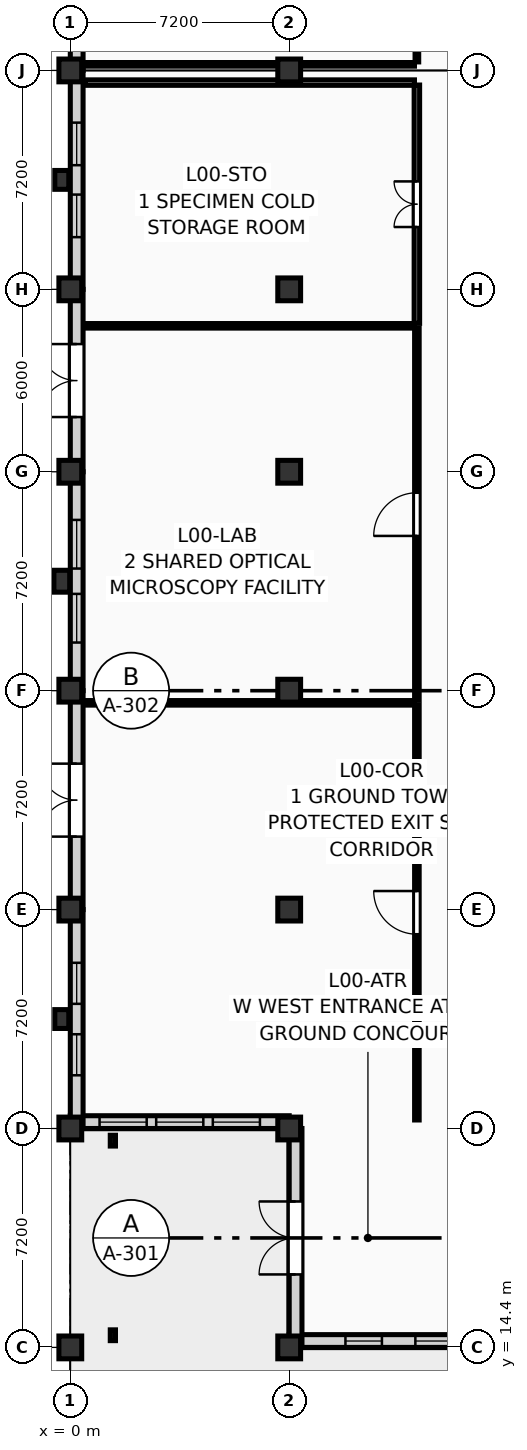
"""IFC4 building model, lengths in metres.
Left out: names, types, materials, properties, quantities, classifications, styles, units other than length and angle.
Written with IfcOpenShell. Run it as: python <this file> out.ifc"""

import sys

from ifc_helpers import new_model, si_unit, direction, frame, frame_2d, origin, origin_2d, place, context, subcontext, project, spatial, rectangle, i_section, extrude, element, fill, save


model = new_model("IFC4")
c1 = context("Model", 3, precision=1e-05, world=origin(), true_north=direction((0.0, 1.0)))
c2 = subcontext(c1, "Body", "Model", "MODEL_VIEW")
j1 = project(units=[si_unit("LENGTHUNIT", "METRE"), si_unit("PLANEANGLEUNIT", "RADIAN")], contexts=[c1])
p1 = place(None, origin())
s1 = spatial("IfcSite", under=j1, at=p1, CompositionType="ELEMENT")
p2 = place(p1, origin())
s2 = spatial("IfcBuilding", under=s1, at=p2, CompositionType="ELEMENT")
p3 = place(p2, origin())
s3 = spatial("IfcBuildingStorey", under=s2, at=p3, CompositionType="ELEMENT", Elevation=0.0)
for number, where, z_axis, x_axis in (
    (1, (0.0, 14.4, 0.0), (0.0, 0.0, 1.0), (1.0, 0.0, 0.0)),
    (2, (0.0, 21.6, 0.0), (0.0, 0.0, 1.0), (1.0, 0.0, 0.0)),
    (3, (0.0, 28.8, 0.0), (0.0, 0.0, 1.0), (1.0, 0.0, 0.0)),
    (4, (0.0, 36.0, 0.0), (0.0, 0.0, 1.0), (1.0, 0.0, 0.0)),
    (5, (0.0, 43.2, 0.0), (0.0, 0.0, 1.0), (1.0, 0.0, 0.0)),
    (6, (0.0, 49.2, 0.0), (0.0, 0.0, 1.0), (1.0, 0.0, 0.0)),
    (7, (0.0, 56.4, 0.0), (0.0, 0.0, 1.0), (1.0, 0.0, 0.0)),
    (8, (7.2, 14.4, 0.0), (0.0, 0.0, 1.0), (1.0, 0.0, 0.0)),
    (9, (7.2, 21.6, 0.0), (0.0, 0.0, 1.0), (1.0, 0.0, 0.0)),
    (10, (7.2, 28.8, 0.0), (0.0, 0.0, 1.0), (1.0, 0.0, 0.0)),
    (11, (7.2, 36.0, 0.0), (0.0, 0.0, 1.0), (1.0, 0.0, 0.0)),
    (12, (7.2, 43.2, 0.0), (0.0, 0.0, 1.0), (1.0, 0.0, 0.0)),
    (13, (7.2, 49.2, 0.0), (0.0, 0.0, 1.0), (1.0, 0.0, 0.0)),
    (14, (7.2, 56.4, 0.0), (0.0, 0.0, 1.0), (1.0, 0.0, 0.0)),
):
    element("IfcColumn", number, at=place(p3, frame(where, z_axis=z_axis, x_axis=x_axis)), inside=s3, PredefinedType="COLUMN", context=c2, shape_type="SweptSolid", body=[
        extrude(rectangle(XDim=0.75, YDim=0.75, at=origin_2d()), origin(), (0.0, 0.0, 1.0), 4.5),
    ])
for number, where, z_axis, x_axis in (
    (15, (1.4, 14.8, 0.0), (0.0, 0.0, 1.0), (1.0, 0.0, 0.0)),
    (16, (1.4, 21.2, 0.0), (0.0, 0.0, 1.0), (1.0, 0.0, 0.0)),
):
    element("IfcColumn", number, at=place(p3, frame(where, z_axis=z_axis, x_axis=x_axis)), inside=s3, PredefinedType="COLUMN", context=c2, shape_type="SweptSolid", body=[
        extrude(i_section(OverallWidth=0.171, OverallDepth=0.355, WebThickness=0.007, FlangeThickness=0.012, FilletRadius=0.013, at=origin_2d()), origin(), (0.0, 0.0, 1.0), 4.2),
    ])
p4 = place(p3, frame((-0.28, 25.2, 0.0), z_axis=(0.0, 0.0, 1.0), x_axis=(1.0, 0.0, 0.0)))
e17 = element("IfcColumn", 17, at=p4, inside=s3, PredefinedType="PILASTER", context=c2, shape_type="SweptSolid", body=[
    extrude(rectangle(XDim=0.46, YDim=0.62, at=origin_2d()), origin(), (0.0, 0.0, 1.0), 4.5),
])
p5 = place(p3, frame((-0.28, 39.6, 0.0), z_axis=(0.0, 0.0, 1.0), x_axis=(1.0, 0.0, 0.0)))
e18 = element("IfcColumn", 18, at=p5, inside=s3, PredefinedType="PILASTER", context=c2, shape_type="SweptSolid", body=[
    extrude(rectangle(XDim=0.52, YDim=0.72, at=origin_2d()), origin(), (0.0, 0.0, 1.0), 4.5),
])
p6 = place(p3, frame((-0.28, 52.8, 0.0), z_axis=(0.0, 0.0, 1.0), x_axis=(1.0, 0.0, 0.0)))
e19 = element("IfcColumn", 19, at=p6, inside=s3, PredefinedType="PILASTER", context=c2, shape_type="SweptSolid", body=[
    extrude(rectangle(XDim=0.46, YDim=0.62, at=origin_2d()), origin(), (0.0, 0.0, 1.0), 4.5),
])
p7 = place(p3, frame((7.2, 14.61, 0.0), z_axis=(0.0, 0.0, 1.0), x_axis=(1.0, 0.0, 0.0)))
e20 = element("IfcWall", 20, at=p7, inside=s3, PredefinedType="SOLIDWALL", context=c2, shape_type="SweptSolid", body=[
    extrude(rectangle(XDim=7.2, YDim=0.42, at=frame_2d((3.6, 0.0))), origin(), (0.0, 0.0, 1.0), 3.62),
])
p8 = place(p7, frame((1.85, 0.0, 0.45)))
e21 = element("IfcOpeningElement", 21, at=p8, cuts=e20, PredefinedType="OPENING", context=c2, shape_type="SweptSolid", body=[
    extrude(rectangle(XDim=1.2, YDim=2.35, at=frame_2d((0.6, 1.175))), frame((0.0, 0.222, 0.0), z_axis=(0.0, -1.0, 0.0), x_axis=(1.0, 0.0, 0.0)), (0.0, 0.0, 1.0), 0.444),
])
p9 = place(p7, frame((4.15, 0.0, 0.45)))
e22 = element("IfcOpeningElement", 22, at=p9, cuts=e20, PredefinedType="OPENING", context=c2, shape_type="SweptSolid", body=[
    extrude(rectangle(XDim=1.2, YDim=2.35, at=frame_2d((0.6, 1.175))), frame((0.0, 0.222, 0.0), z_axis=(0.0, -1.0, 0.0), x_axis=(1.0, 0.0, 0.0)), (0.0, 0.0, 1.0), 0.444),
])
p10 = place(p3, frame((7.41, 14.4, 0.0), z_axis=(0.0, 0.0, 1.0), x_axis=(0.0, 1.0, 0.0)))
e23 = element("IfcWall", 23, at=p10, inside=s3, PredefinedType="SOLIDWALL", context=c2, shape_type="SweptSolid", body=[
    extrude(rectangle(XDim=7.2, YDim=0.42, at=frame_2d((3.6, 0.0))), origin(), (0.0, 0.0, 1.0), 3.62),
])
p11 = place(p10, frame((2.4, 0.0, 0.0)))
e24 = element("IfcOpeningElement", 24, at=p11, cuts=e23, PredefinedType="OPENING", context=c2, shape_type="SweptSolid", body=[
    extrude(rectangle(XDim=2.4, YDim=2.6, at=frame_2d((1.2, 1.3))), frame((0.0, 0.222, 0.0), z_axis=(0.0, -1.0, 0.0), x_axis=(1.0, 0.0, 0.0)), (0.0, 0.0, 1.0), 0.444),
])
p12 = place(p3, frame((0.0, 21.81, 0.0), z_axis=(0.0, 0.0, 1.0), x_axis=(1.0, 0.0, 0.0)))
e25 = element("IfcWall", 25, at=p12, inside=s3, PredefinedType="SOLIDWALL", context=c2, shape_type="SweptSolid", body=[
    extrude(rectangle(XDim=7.2, YDim=0.42, at=frame_2d((3.6, 0.0))), origin(), (0.0, 0.0, 1.0), 3.62),
])
p13 = place(p12, frame((0.962, 0.0, 0.18)))
e26 = element("IfcOpeningElement", 26, at=p13, cuts=e25, PredefinedType="OPENING", context=c2, shape_type="SweptSolid", body=[
    extrude(rectangle(XDim=1.55, YDim=3.25, at=frame_2d((0.775, 1.625))), frame((0.0, 0.222, 0.0), z_axis=(0.0, -1.0, 0.0), x_axis=(1.0, 0.0, 0.0)), (0.0, 0.0, 1.0), 0.444),
])
p14 = place(p12, frame((2.825, 0.0, 0.18)))
e27 = element("IfcOpeningElement", 27, at=p14, cuts=e25, PredefinedType="OPENING", context=c2, shape_type="SweptSolid", body=[
    extrude(rectangle(XDim=1.55, YDim=3.25, at=frame_2d((0.775, 1.625))), frame((0.0, 0.222, 0.0), z_axis=(0.0, -1.0, 0.0), x_axis=(1.0, 0.0, 0.0)), (0.0, 0.0, 1.0), 0.444),
])
p15 = place(p12, frame((4.688, 0.0, 0.18)))
e28 = element("IfcOpeningElement", 28, at=p15, cuts=e25, PredefinedType="OPENING", context=c2, shape_type="SweptSolid", body=[
    extrude(rectangle(XDim=1.55, YDim=3.25, at=frame_2d((0.775, 1.625))), frame((0.0, 0.222, 0.0), z_axis=(0.0, -1.0, 0.0), x_axis=(1.0, 0.0, 0.0)), (0.0, 0.0, 1.0), 0.444),
])
p16 = place(p3, frame((0.21, 21.6, 0.0), z_axis=(0.0, 0.0, 1.0), x_axis=(0.0, 1.0, 0.0)))
e29 = element("IfcWall", 29, at=p16, inside=s3, PredefinedType="SOLIDWALL", context=c2, shape_type="SweptSolid", body=[
    extrude(rectangle(XDim=7.2, YDim=0.42, at=frame_2d((3.6, 0.0))), origin(), (0.0, 0.0, 1.0), 3.62),
])
p17 = place(p16, frame((1.75, 0.0, 0.45)))
e30 = element("IfcOpeningElement", 30, at=p17, cuts=e29, PredefinedType="OPENING", context=c2, shape_type="SweptSolid", body=[
    extrude(rectangle(XDim=1.35, YDim=2.75, at=frame_2d((0.675, 1.375))), frame((0.0, 0.222, 0.0), z_axis=(0.0, -1.0, 0.0), x_axis=(1.0, 0.0, 0.0)), (0.0, 0.0, 1.0), 0.444),
])
p18 = place(p16, frame((4.1, 0.0, 0.45)))
e31 = element("IfcOpeningElement", 31, at=p18, cuts=e29, PredefinedType="OPENING", context=c2, shape_type="SweptSolid", body=[
    extrude(rectangle(XDim=1.35, YDim=2.75, at=frame_2d((0.675, 1.375))), frame((0.0, 0.222, 0.0), z_axis=(0.0, -1.0, 0.0), x_axis=(1.0, 0.0, 0.0)), (0.0, 0.0, 1.0), 0.444),
])
p19 = place(p3, frame((0.21, 28.8, 0.0), z_axis=(0.0, 0.0, 1.0), x_axis=(0.0, 1.0, 0.0)))
e32 = element("IfcWall", 32, at=p19, inside=s3, PredefinedType="SOLIDWALL", context=c2, shape_type="SweptSolid", body=[
    extrude(rectangle(XDim=7.2, YDim=0.42, at=frame_2d((3.6, 0.0))), origin(), (0.0, 0.0, 1.0), 3.62),
])
p20 = place(p19, frame((2.4, 0.0, 0.0)))
e33 = element("IfcOpeningElement", 33, at=p20, cuts=e32, PredefinedType="OPENING", context=c2, shape_type="SweptSolid", body=[
    extrude(rectangle(XDim=2.4, YDim=2.6, at=frame_2d((1.2, 1.3))), frame((0.0, 0.222, 0.0), z_axis=(0.0, -1.0, 0.0), x_axis=(1.0, 0.0, 0.0)), (0.0, 0.0, 1.0), 0.444),
])
p21 = place(p3, frame((0.21, 36.0, 0.0), z_axis=(0.0, 0.0, 1.0), x_axis=(0.0, 1.0, 0.0)))
e34 = element("IfcWall", 34, at=p21, inside=s3, PredefinedType="SOLIDWALL", context=c2, shape_type="SweptSolid", body=[
    extrude(rectangle(XDim=7.2, YDim=0.42, at=frame_2d((3.6, 0.0))), origin(), (0.0, 0.0, 1.0), 3.62),
])
p22 = place(p21, frame((1.583, 0.0, 0.45)))
e35 = element("IfcOpeningElement", 35, at=p22, cuts=e34, PredefinedType="OPENING", context=c2, shape_type="SweptSolid", body=[
    extrude(rectangle(XDim=1.6, YDim=2.65, at=frame_2d((0.8, 1.325))), frame((0.0, 0.222, 0.0), z_axis=(0.0, -1.0, 0.0), x_axis=(1.0, 0.0, 0.0)), (0.0, 0.0, 1.0), 0.444),
])
p23 = place(p21, frame((4.017, 0.0, 0.45)))
e36 = element("IfcOpeningElement", 36, at=p23, cuts=e34, PredefinedType="OPENING", context=c2, shape_type="SweptSolid", body=[
    extrude(rectangle(XDim=1.6, YDim=2.65, at=frame_2d((0.8, 1.325))), frame((0.0, 0.222, 0.0), z_axis=(0.0, -1.0, 0.0), x_axis=(1.0, 0.0, 0.0)), (0.0, 0.0, 1.0), 0.444),
])
p24 = place(p3, frame((0.21, 43.2, 0.0), z_axis=(0.0, 0.0, 1.0), x_axis=(0.0, 1.0, 0.0)))
e37 = element("IfcWall", 37, at=p24, inside=s3, PredefinedType="SOLIDWALL", context=c2, shape_type="SweptSolid", body=[
    extrude(rectangle(XDim=6.0, YDim=0.42, at=frame_2d((3.0, 0.0))), origin(), (0.0, 0.0, 1.0), 3.62),
])
p25 = place(p24, frame((1.8, 0.0, 0.0)))
e38 = element("IfcOpeningElement", 38, at=p25, cuts=e37, PredefinedType="OPENING", context=c2, shape_type="SweptSolid", body=[
    extrude(rectangle(XDim=2.4, YDim=2.6, at=frame_2d((1.2, 1.3))), frame((0.0, 0.222, 0.0), z_axis=(0.0, -1.0, 0.0), x_axis=(1.0, 0.0, 0.0)), (0.0, 0.0, 1.0), 0.444),
])
p26 = place(p3, frame((0.21, 49.2, 0.0), z_axis=(0.0, 0.0, 1.0), x_axis=(0.0, 1.0, 0.0)))
e39 = element("IfcWall", 39, at=p26, inside=s3, PredefinedType="SOLIDWALL", context=c2, shape_type="SweptSolid", body=[
    extrude(rectangle(XDim=7.2, YDim=0.42, at=frame_2d((3.6, 0.0))), origin(), (0.0, 0.0, 1.0), 3.62),
])
p27 = place(p26, frame((1.717, 0.0, 0.45)))
e40 = element("IfcOpeningElement", 40, at=p27, cuts=e39, PredefinedType="OPENING", context=c2, shape_type="SweptSolid", body=[
    extrude(rectangle(XDim=1.4, YDim=2.55, at=frame_2d((0.7, 1.275))), frame((0.0, 0.222, 0.0), z_axis=(0.0, -1.0, 0.0), x_axis=(1.0, 0.0, 0.0)), (0.0, 0.0, 1.0), 0.444),
])
p28 = place(p26, frame((4.083, 0.0, 0.45)))
e41 = element("IfcOpeningElement", 41, at=p28, cuts=e39, PredefinedType="OPENING", context=c2, shape_type="SweptSolid", body=[
    extrude(rectangle(XDim=1.4, YDim=2.55, at=frame_2d((0.7, 1.275))), frame((0.0, 0.222, 0.0), z_axis=(0.0, -1.0, 0.0), x_axis=(1.0, 0.0, 0.0)), (0.0, 0.0, 1.0), 0.444),
])
p29 = place(p3, frame((0.21, 56.4, 0.0), z_axis=(0.0, 0.0, 1.0), x_axis=(0.0, 1.0, 0.0)))
e42 = element("IfcWall", 42, at=p29, inside=s3, PredefinedType="SOLIDWALL", context=c2, shape_type="SweptSolid", body=[
    extrude(rectangle(XDim=7.2, YDim=0.42, at=frame_2d((3.6, 0.0))), origin(), (0.0, 0.0, 1.0), 3.62),
])
p30 = place(p29, frame((1.783, 0.0, 0.45)))
e43 = element("IfcOpeningElement", 43, at=p30, cuts=e42, PredefinedType="OPENING", context=c2, shape_type="SweptSolid", body=[
    extrude(rectangle(XDim=1.3, YDim=2.5, at=frame_2d((0.65, 1.25))), frame((0.0, 0.222, 0.0), z_axis=(0.0, -1.0, 0.0), x_axis=(1.0, 0.0, 0.0)), (0.0, 0.0, 1.0), 0.444),
])
p31 = place(p29, frame((4.117, 0.0, 0.45)))
e44 = element("IfcOpeningElement", 44, at=p31, cuts=e42, PredefinedType="OPENING", context=c2, shape_type="SweptSolid", body=[
    extrude(rectangle(XDim=1.3, YDim=2.5, at=frame_2d((0.65, 1.25))), frame((0.0, 0.222, 0.0), z_axis=(0.0, -1.0, 0.0), x_axis=(1.0, 0.0, 0.0)), (0.0, 0.0, 1.0), 0.444),
])
p32 = place(p3, frame((11.4, 21.88, 0.0), z_axis=(0.0, 0.0, 1.0), x_axis=(0.0, 1.0, 0.0)))
e45 = element("IfcWall", 45, at=p32, inside=s3, PredefinedType="PARTITIONING", context=c2, shape_type="SweptSolid", body=[
    extrude(rectangle(XDim=13.64, YDim=0.15, at=frame_2d((6.82, 0.0))), origin(), (0.0, 0.0, 1.0), 4.235),
])
p33 = place(p32, frame((6.11, 0.0, 0.0)))
e46 = element("IfcOpeningElement", 46, at=p33, cuts=e45, PredefinedType="OPENING", context=c2, shape_type="SweptSolid", body=[
    extrude(rectangle(XDim=1.42, YDim=2.22, at=frame_2d((0.71, 1.11))), frame((0.0, 0.087, 0.0), z_axis=(0.0, -1.0, 0.0), x_axis=(1.0, 0.0, 0.0)), (0.0, 0.0, 1.0), 0.174),
])
p34 = place(p3, frame((0.48, 35.6, 0.0), z_axis=(0.0, 0.0, 1.0), x_axis=(1.0, 0.0, 0.0)))
e47 = element("IfcWall", 47, at=p34, inside=s3, PredefinedType="PARTITIONING", context=c2, shape_type="SweptSolid", body=[
    extrude(rectangle(XDim=10.84, YDim=0.15, at=frame_2d((5.42, 0.0))), origin(), (0.0, 0.0, 1.0), 3.485),
])
p35 = place(p3, frame((11.4, 35.68, 0.0), z_axis=(0.0, 0.0, 1.0), x_axis=(0.0, 1.0, 0.0)))
e48 = element("IfcWall", 48, at=p35, inside=s3, PredefinedType="PARTITIONING", context=c2, shape_type="SweptSolid", body=[
    extrude(rectangle(XDim=12.24, YDim=0.15, at=frame_2d((6.12, 0.0))), origin(), (0.0, 0.0, 1.0), 4.235),
])
p36 = place(p35, frame((5.41, 0.0, 0.0)))
e49 = element("IfcOpeningElement", 49, at=p36, cuts=e48, PredefinedType="OPENING", context=c2, shape_type="SweptSolid", body=[
    extrude(rectangle(XDim=1.42, YDim=2.22, at=frame_2d((0.71, 1.11))), frame((0.0, 0.087, 0.0), z_axis=(0.0, -1.0, 0.0), x_axis=(1.0, 0.0, 0.0)), (0.0, 0.0, 1.0), 0.174),
])
p37 = place(p3, frame((0.48, 48.0, 0.0), z_axis=(0.0, 0.0, 1.0), x_axis=(1.0, 0.0, 0.0)))
e50 = element("IfcWall", 50, at=p37, inside=s3, PredefinedType="PARTITIONING", context=c2, shape_type="SweptSolid", body=[
    extrude(rectangle(XDim=10.84, YDim=0.15, at=frame_2d((5.42, 0.0))), origin(), (0.0, 0.0, 1.0), 4.235),
])
p38 = place(p3, frame((11.4, 48.08, 0.0), z_axis=(0.0, 0.0, 1.0), x_axis=(0.0, 1.0, 0.0)))
e51 = element("IfcWall", 51, at=p38, inside=s3, PredefinedType="PARTITIONING", context=c2, shape_type="SweptSolid", body=[
    extrude(rectangle(XDim=7.84, YDim=0.18, at=frame_2d((3.92, 0.0))), origin(), (0.0, 0.0, 1.0), 4.235),
])
p39 = place(p38, frame((3.17, 0.0, 0.0)))
e52 = element("IfcOpeningElement", 52, at=p39, cuts=e51, PredefinedType="OPENING", context=c2, shape_type="SweptSolid", body=[
    extrude(rectangle(XDim=1.5, YDim=2.25, at=frame_2d((0.75, 1.125))), frame((0.0, 0.102, 0.0), z_axis=(0.0, -1.0, 0.0), x_axis=(1.0, 0.0, 0.0)), (0.0, 0.0, 1.0), 0.204),
])
p40 = place(p3, frame((0.48, 56.0, 0.0), z_axis=(0.0, 0.0, 1.0), x_axis=(1.0, 0.0, 0.0)))
e53 = element("IfcWall", 53, at=p40, inside=s3, PredefinedType="PARTITIONING", context=c2, shape_type="SweptSolid", body=[
    extrude(rectangle(XDim=10.84, YDim=0.18, at=frame_2d((5.42, 0.0))), origin(), (0.0, 0.0, 1.0), 3.485),
])
p41 = place(p3, frame((0.48, 56.6, 0.0), z_axis=(0.0, 0.0, 1.0), x_axis=(1.0, 0.0, 0.0)))
e54 = element("IfcWall", 54, at=p41, inside=s3, PredefinedType="PARTITIONING", context=c2, shape_type="SweptSolid", body=[
    extrude(rectangle(XDim=10.84, YDim=0.12, at=frame_2d((5.42, 0.0))), origin(), (0.0, 0.0, 1.0), 3.485),
])
p42 = place(p3, frame((11.4, 56.68, 0.0), z_axis=(0.0, 0.0, 1.0), x_axis=(0.0, 1.0, 0.0)))
e55 = element("IfcWall", 55, at=p42, inside=s3, PredefinedType="PARTITIONING", context=c2, shape_type="SweptSolid", body=[
    extrude(rectangle(XDim=28.44, YDim=0.12, at=frame_2d((14.22, 0.0))), origin(), (0.0, 0.0, 1.0), 4.235),
])
p43 = place(p42, frame((13.37, 0.0, 0.0)))
e56 = element("IfcOpeningElement", 56, at=p43, cuts=e55, PredefinedType="OPENING", context=c2, shape_type="SweptSolid", body=[
    extrude(rectangle(XDim=1.7, YDim=2.28, at=frame_2d((0.85, 1.14))), frame((0.0, 0.072, 0.0), z_axis=(0.0, -1.0, 0.0), x_axis=(1.0, 0.0, 0.0)), (0.0, 0.0, 1.0), 0.144),
])
p44 = place(p8, origin())
e57 = element("IfcWindow", 57, at=p44, inside=s3, PartitioningType="SINGLE_PANEL", PredefinedType="WINDOW", context=c2, shape_type="SweptSolid", body=[
    extrude(rectangle(XDim=1.2, YDim=2.35, at=frame_2d((0.6, 1.175))), frame((0.0, 0.03, 0.0), z_axis=(0.0, -1.0, 0.0), x_axis=(1.0, 0.0, 0.0)), (0.0, 0.0, 1.0), 0.06),
])
fill(e21, e57)
p45 = place(p9, origin())
e58 = element("IfcWindow", 58, at=p45, inside=s3, PartitioningType="SINGLE_PANEL", PredefinedType="WINDOW", context=c2, shape_type="SweptSolid", body=[
    extrude(rectangle(XDim=1.2, YDim=2.35, at=frame_2d((0.6, 1.175))), frame((0.0, 0.03, 0.0), z_axis=(0.0, -1.0, 0.0), x_axis=(1.0, 0.0, 0.0)), (0.0, 0.0, 1.0), 0.06),
])
fill(e22, e58)
p46 = place(p11, origin())
e59 = element("IfcDoor", 59, at=p46, inside=s3, OperationType="DOUBLE_DOOR_SINGLE_SWING", PredefinedType="DOOR", context=c2, shape_type="SweptSolid", body=[
    extrude(rectangle(XDim=2.4, YDim=2.6, at=frame_2d((1.2, 1.3))), frame((0.0, 0.025, 0.0), z_axis=(0.0, -1.0, 0.0), x_axis=(1.0, 0.0, 0.0)), (0.0, 0.0, 1.0), 0.05),
])
fill(e24, e59)
p47 = place(p13, origin())
e60 = element("IfcWindow", 60, at=p47, inside=s3, PartitioningType="SINGLE_PANEL", PredefinedType="WINDOW", context=c2, shape_type="SweptSolid", body=[
    extrude(rectangle(XDim=1.55, YDim=3.25, at=frame_2d((0.775, 1.625))), frame((0.0, 0.03, 0.0), z_axis=(0.0, -1.0, 0.0), x_axis=(1.0, 0.0, 0.0)), (0.0, 0.0, 1.0), 0.06),
])
fill(e26, e60)
p48 = place(p14, origin())
e61 = element("IfcWindow", 61, at=p48, inside=s3, PartitioningType="SINGLE_PANEL", PredefinedType="WINDOW", context=c2, shape_type="SweptSolid", body=[
    extrude(rectangle(XDim=1.55, YDim=3.25, at=frame_2d((0.775, 1.625))), frame((0.0, 0.03, 0.0), z_axis=(0.0, -1.0, 0.0), x_axis=(1.0, 0.0, 0.0)), (0.0, 0.0, 1.0), 0.06),
])
fill(e27, e61)
p49 = place(p15, origin())
e62 = element("IfcWindow", 62, at=p49, inside=s3, PartitioningType="SINGLE_PANEL", PredefinedType="WINDOW", context=c2, shape_type="SweptSolid", body=[
    extrude(rectangle(XDim=1.55, YDim=3.25, at=frame_2d((0.775, 1.625))), frame((0.0, 0.03, 0.0), z_axis=(0.0, -1.0, 0.0), x_axis=(1.0, 0.0, 0.0)), (0.0, 0.0, 1.0), 0.06),
])
fill(e28, e62)
p50 = place(p17, origin())
e63 = element("IfcWindow", 63, at=p50, inside=s3, PartitioningType="SINGLE_PANEL", PredefinedType="WINDOW", context=c2, shape_type="SweptSolid", body=[
    extrude(rectangle(XDim=1.35, YDim=2.75, at=frame_2d((0.675, 1.375))), frame((0.0, 0.03, 0.0), z_axis=(0.0, -1.0, 0.0), x_axis=(1.0, 0.0, 0.0)), (0.0, 0.0, 1.0), 0.06),
])
fill(e30, e63)
p51 = place(p18, origin())
e64 = element("IfcWindow", 64, at=p51, inside=s3, PartitioningType="SINGLE_PANEL", PredefinedType="WINDOW", context=c2, shape_type="SweptSolid", body=[
    extrude(rectangle(XDim=1.35, YDim=2.75, at=frame_2d((0.675, 1.375))), frame((0.0, 0.03, 0.0), z_axis=(0.0, -1.0, 0.0), x_axis=(1.0, 0.0, 0.0)), (0.0, 0.0, 1.0), 0.06),
])
fill(e31, e64)
p52 = place(p20, origin())
e65 = element("IfcDoor", 65, at=p52, inside=s3, OperationType="DOUBLE_DOOR_SINGLE_SWING", PredefinedType="DOOR", context=c2, shape_type="SweptSolid", body=[
    extrude(rectangle(XDim=2.4, YDim=2.6, at=frame_2d((1.2, 1.3))), frame((0.0, 0.025, 0.0), z_axis=(0.0, -1.0, 0.0), x_axis=(1.0, 0.0, 0.0)), (0.0, 0.0, 1.0), 0.05),
])
fill(e33, e65)
p53 = place(p22, origin())
e66 = element("IfcWindow", 66, at=p53, inside=s3, PartitioningType="SINGLE_PANEL", PredefinedType="WINDOW", context=c2, shape_type="SweptSolid", body=[
    extrude(rectangle(XDim=1.6, YDim=2.65, at=frame_2d((0.8, 1.325))), frame((0.0, 0.03, 0.0), z_axis=(0.0, -1.0, 0.0), x_axis=(1.0, 0.0, 0.0)), (0.0, 0.0, 1.0), 0.06),
])
fill(e35, e66)
p54 = place(p23, origin())
e67 = element("IfcWindow", 67, at=p54, inside=s3, PartitioningType="SINGLE_PANEL", PredefinedType="WINDOW", context=c2, shape_type="SweptSolid", body=[
    extrude(rectangle(XDim=1.6, YDim=2.65, at=frame_2d((0.8, 1.325))), frame((0.0, 0.03, 0.0), z_axis=(0.0, -1.0, 0.0), x_axis=(1.0, 0.0, 0.0)), (0.0, 0.0, 1.0), 0.06),
])
fill(e36, e67)
p55 = place(p25, origin())
e68 = element("IfcDoor", 68, at=p55, inside=s3, OperationType="DOUBLE_DOOR_SINGLE_SWING", PredefinedType="DOOR", context=c2, shape_type="SweptSolid", body=[
    extrude(rectangle(XDim=2.4, YDim=2.6, at=frame_2d((1.2, 1.3))), frame((0.0, 0.025, 0.0), z_axis=(0.0, -1.0, 0.0), x_axis=(1.0, 0.0, 0.0)), (0.0, 0.0, 1.0), 0.05),
])
fill(e38, e68)
p56 = place(p27, origin())
e69 = element("IfcWindow", 69, at=p56, inside=s3, PartitioningType="SINGLE_PANEL", PredefinedType="WINDOW", context=c2, shape_type="SweptSolid", body=[
    extrude(rectangle(XDim=1.4, YDim=2.55, at=frame_2d((0.7, 1.275))), frame((0.0, 0.03, 0.0), z_axis=(0.0, -1.0, 0.0), x_axis=(1.0, 0.0, 0.0)), (0.0, 0.0, 1.0), 0.06),
])
fill(e40, e69)
p57 = place(p28, origin())
e70 = element("IfcWindow", 70, at=p57, inside=s3, PartitioningType="SINGLE_PANEL", PredefinedType="WINDOW", context=c2, shape_type="SweptSolid", body=[
    extrude(rectangle(XDim=1.4, YDim=2.55, at=frame_2d((0.7, 1.275))), frame((0.0, 0.03, 0.0), z_axis=(0.0, -1.0, 0.0), x_axis=(1.0, 0.0, 0.0)), (0.0, 0.0, 1.0), 0.06),
])
fill(e41, e70)
p58 = place(p33, origin())
e71 = element("IfcDoor", 71, at=p58, inside=s3, OperationType="SINGLE_SWING_RIGHT", PredefinedType="DOOR", context=c2, shape_type="SweptSolid", body=[
    extrude(rectangle(XDim=1.42, YDim=2.22, at=frame_2d((0.71, 1.11))), frame((0.0, 0.025, 0.0), z_axis=(0.0, -1.0, 0.0), x_axis=(1.0, 0.0, 0.0)), (0.0, 0.0, 1.0), 0.05),
])
fill(e46, e71)
p59 = place(p36, origin())
e72 = element("IfcDoor", 72, at=p59, inside=s3, OperationType="SINGLE_SWING_LEFT", PredefinedType="DOOR", context=c2, shape_type="SweptSolid", body=[
    extrude(rectangle(XDim=1.42, YDim=2.22, at=frame_2d((0.71, 1.11))), frame((0.0, 0.025, 0.0), z_axis=(0.0, -1.0, 0.0), x_axis=(1.0, 0.0, 0.0)), (0.0, 0.0, 1.0), 0.05),
])
fill(e49, e72)
p60 = place(p39, origin())
e73 = element("IfcDoor", 73, at=p60, inside=s3, OperationType="DOUBLE_DOOR_SINGLE_SWING", PredefinedType="DOOR", context=c2, shape_type="SweptSolid", body=[
    extrude(rectangle(XDim=1.5, YDim=2.25, at=frame_2d((0.75, 1.125))), frame((0.0, 0.025, 0.0), z_axis=(0.0, -1.0, 0.0), x_axis=(1.0, 0.0, 0.0)), (0.0, 0.0, 1.0), 0.05),
])
fill(e52, e73)
save(model, sys.argv[1])
